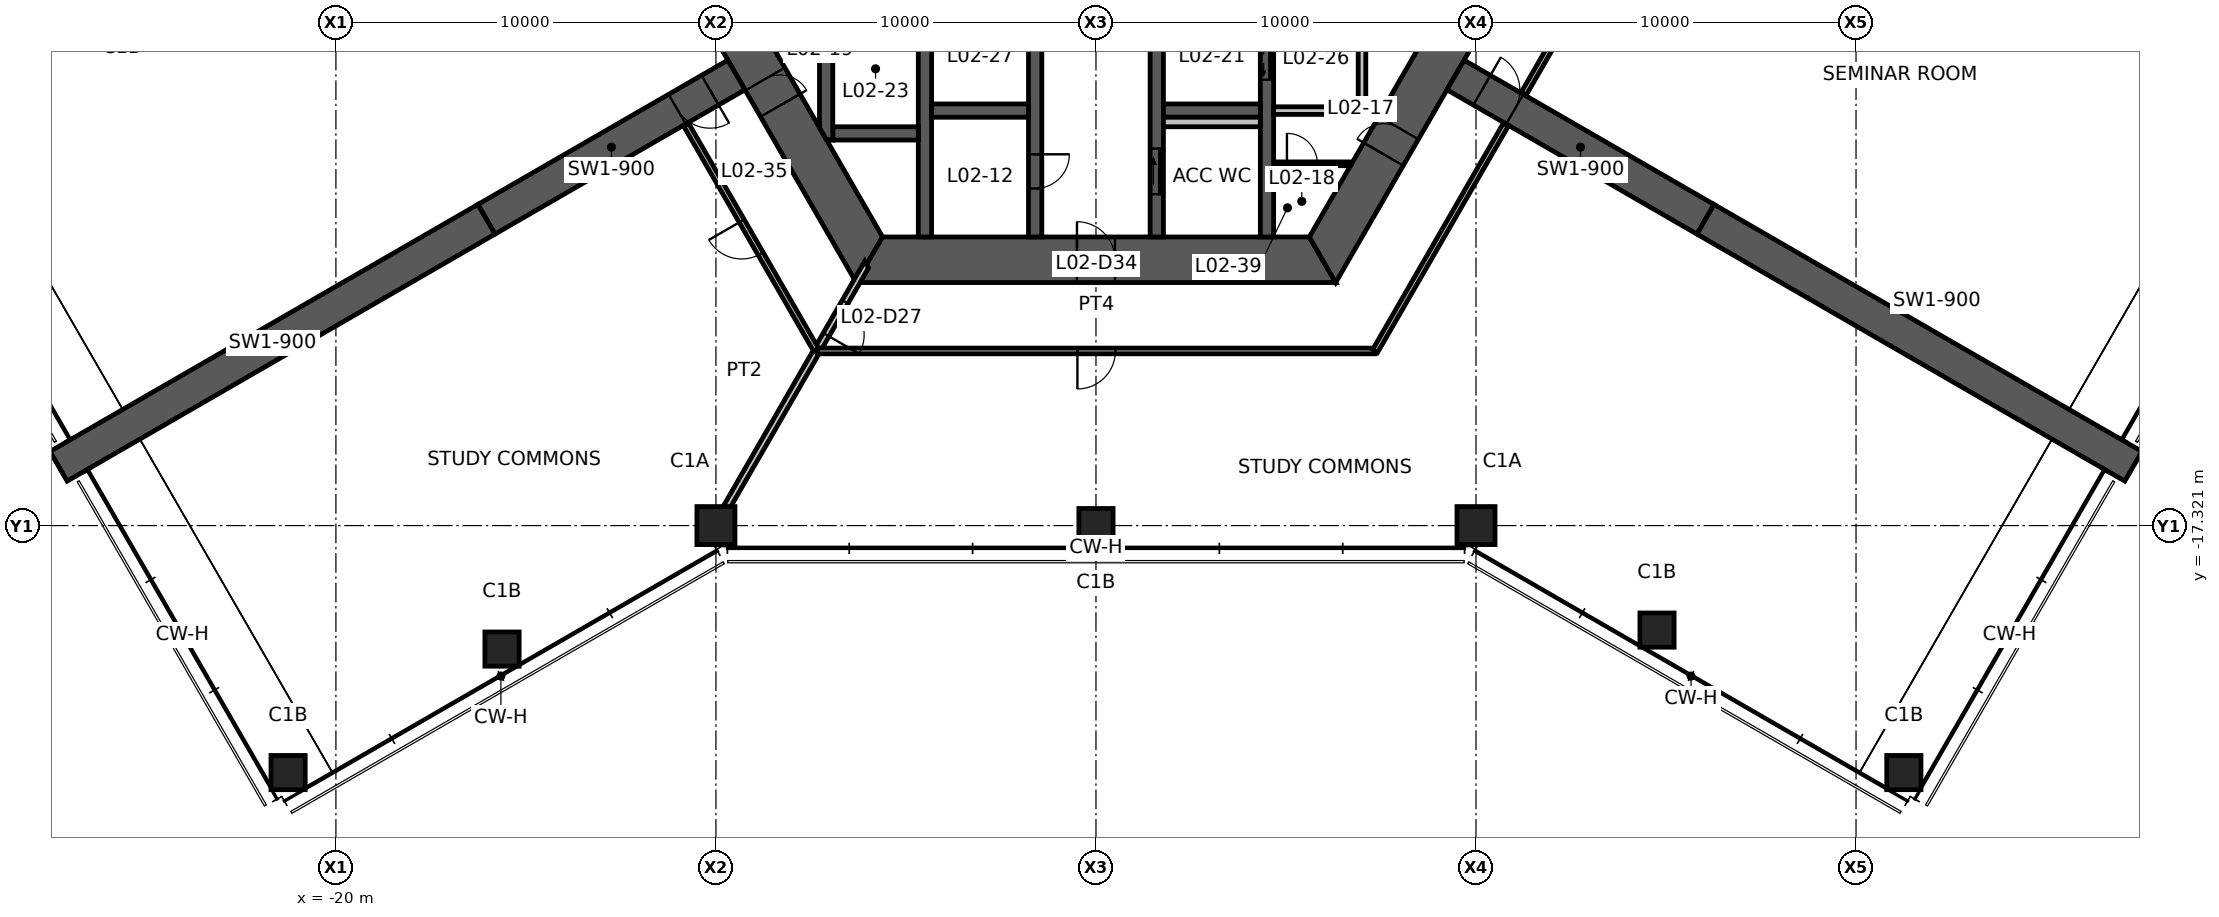
"""IFC4 building model, lengths in metres.
Left out: names, types, materials, properties, quantities, classifications, styles, units other than length and angle.
Written with IfcOpenShell. Run it as: python <this file> out.ifc"""

import sys

from ifc_helpers import new_model, si_unit, direction, frame, frame_2d, origin, origin_2d, place, context, subcontext, project, spatial, polyline, rectangle, hollow_rectangle, outline, extrude, element, fill, save


model = new_model("IFC4")
c1 = context("Model", 3, precision=1e-05, world=origin(), true_north=direction((0.0, 1.0)))
c2 = subcontext(c1, "Body", "Model", "MODEL_VIEW")
j1 = project(units=[si_unit("LENGTHUNIT", "METRE"), si_unit("PLANEANGLEUNIT", "RADIAN")], contexts=[c1])
p1 = place(None, origin())
s1 = spatial("IfcSite", under=j1, at=p1, CompositionType="ELEMENT")
p2 = place(p1, origin())
s2 = spatial("IfcBuilding", under=s1, at=p2, CompositionType="ELEMENT")
p3 = place(p2, frame((0.0, 0.0, 5.5)))
s3 = spatial("IfcBuildingStorey", under=s2, at=p3, CompositionType="ELEMENT", Elevation=5.5)
for number, where, z_axis, x_axis in (
    (1, (-10.0, -17.321, 0.0), (0.0, 0.0, 1.0), (1.0, 0.0, 0.0)),
    (2, (10.0, -17.321, 0.0), (0.0, 0.0, 1.0), (1.0, 0.0, 0.0)),
):
    element("IfcColumn", number, at=place(p3, frame(where, z_axis=z_axis, x_axis=x_axis)), inside=s3, PredefinedType="COLUMN", context=c2, shape_type="SweptSolid", body=[
        extrude(hollow_rectangle(XDim=1.0, YDim=1.0, WallThickness=0.06, at=origin_2d()), origin(), (0.0, 0.0, 1.0), 4.5),
    ])
for number, where, z_axis, x_axis in (
    (3, (0.0, -17.321, 0.0), (0.0, 0.0, 1.0), (1.0, 0.0, 0.0)),
    (4, (-15.629, -20.571, 0.0), (0.0, 0.0, 1.0), (1.0, 0.0, 0.0)),
    (5, (-21.258, -23.821, 0.0), (0.0, 0.0, 1.0), (1.0, 0.0, 0.0)),
    (6, (14.763, -20.071, 0.0), (0.0, 0.0, 1.0), (1.0, 0.0, 0.0)),
    (7, (21.258, -23.821, 0.0), (0.0, 0.0, 1.0), (1.0, 0.0, 0.0)),
):
    element("IfcColumn", number, at=place(p3, frame(where, z_axis=z_axis, x_axis=x_axis)), inside=s3, PredefinedType="COLUMN", context=c2, shape_type="SweptSolid", body=[
        extrude(hollow_rectangle(XDim=0.9, YDim=0.9, WallThickness=0.05, at=origin_2d()), origin(), (0.0, 0.0, 1.0), 4.5),
    ])
p4 = place(p3, frame((-11.922, 0.0, 0.0), z_axis=(0.0, 0.0, 1.0), x_axis=(0.500004296715, -0.866022923061, 0.0)))
e8 = element("IfcWall", 8, at=p4, inside=s3, PredefinedType="SHEAR", context=c2, shape_type="SweptSolid", body=[
    extrude(outline(polyline([(-0.346, -0.6), (6.431, -0.6), (7.231, -0.6), (12.269, -0.6), (11.576, 0.6), (7.231, 0.6), (6.431, 0.6), (0.346, 0.6), (-0.346, -0.6)])), origin(), (0.0, 0.0, 1.0), 4.5),
])
p5 = place(p4, frame((6.431, 0.0, 0.0)))
e9 = element("IfcOpeningElement", 9, at=p5, cuts=e8, PredefinedType="OPENING", context=c2, shape_type="SweptSolid", body=[
    extrude(rectangle(XDim=0.8, YDim=2.1, at=frame_2d((0.4, 1.05))), frame((0.0, 0.61, 0.0), z_axis=(0.0, -1.0, 0.0), x_axis=(1.0, 0.0, 0.0)), (0.0, 0.0, 1.0), 1.22),
])
p6 = place(p3, frame((-5.961, -10.325, 0.0), z_axis=(0.0, 0.0, 1.0), x_axis=(1.0, 0.0, 0.0)))
e10 = element("IfcWall", 10, at=p6, inside=s3, PredefinedType="SHEAR", context=c2, shape_type="SweptSolid", body=[
    extrude(outline(polyline([(-0.346, -0.6), (5.461, -0.6), (6.461, -0.6), (12.269, -0.6), (11.576, 0.6), (6.461, 0.6), (5.461, 0.6), (0.346, 0.6), (-0.346, -0.6)])), origin(), (0.0, 0.0, 1.0), 4.5),
])
p7 = place(p6, frame((5.461, 0.0, 0.0)))
e11 = element("IfcOpeningElement", 11, at=p7, cuts=e10, PredefinedType="OPENING", context=c2, shape_type="SweptSolid", body=[
    extrude(rectangle(XDim=1.0, YDim=2.1, at=frame_2d((0.5, 1.05))), frame((0.0, 0.61, 0.0), z_axis=(0.0, -1.0, 0.0), x_axis=(1.0, 0.0, 0.0)), (0.0, 0.0, 1.0), 1.22),
])
p8 = place(p3, frame((5.961, -10.325, 0.0), z_axis=(0.0, 0.0, 1.0), x_axis=(0.500004296715, 0.866022923061, 0.0)))
e12 = element("IfcWall", 12, at=p8, inside=s3, PredefinedType="SHEAR", context=c2, shape_type="SweptSolid", body=[
    extrude(outline(polyline([(-0.346, -0.6), (3.208, -0.6), (4.009, -0.6), (12.269, -0.6), (11.576, 0.6), (4.009, 0.6), (3.208, 0.6), (0.346, 0.6), (-0.346, -0.6)])), origin(), (0.0, 0.0, 1.0), 4.5),
])
p9 = place(p8, frame((3.208, 0.0, 0.0)))
e13 = element("IfcOpeningElement", 13, at=p9, cuts=e12, PredefinedType="OPENING", context=c2, shape_type="SweptSolid", body=[
    extrude(rectangle(XDim=0.8, YDim=2.1, at=frame_2d((0.4, 1.05))), frame((0.0, 0.61, 0.0), z_axis=(0.0, -1.0, 0.0), x_axis=(1.0, 0.0, 0.0)), (0.0, 0.0, 1.0), 1.22),
])
p10 = place(p3, frame((-9.461, -5.462, 0.0), z_axis=(0.0, 0.0, 1.0), x_axis=(-0.866019116917, -0.500010889016, 0.0)))
e14 = element("IfcWall", 14, at=p10, inside=s3, PredefinedType="SHEAR", context=c2, shape_type="SweptSolid", body=[
    extrude(rectangle(XDim=7.595, YDim=0.9, at=frame_2d((3.798, 0.0))), origin(), (0.0, 0.0, 1.0), 4.5),
])
p11 = place(p10, frame((0.8, 0.0, 0.0)))
e15 = element("IfcOpeningElement", 15, at=p11, cuts=e14, PredefinedType="OPENING", context=c2, shape_type="SweptSolid", body=[
    extrude(rectangle(XDim=1.0, YDim=2.1, at=frame_2d((0.5, 1.05))), frame((0.0, 0.46, 0.0), z_axis=(0.0, -1.0, 0.0), x_axis=(1.0, 0.0, 0.0)), (0.0, 0.0, 1.0), 0.92),
])
p12 = place(p3, frame((-16.039, -9.26, 0.0), z_axis=(0.0, 0.0, 1.0), x_axis=(-0.866024837091, -0.50000098154, 0.0)))
e16 = element("IfcWall", 16, at=p12, inside=s3, PredefinedType="SHEAR", context=c2, shape_type="SweptSolid", body=[
    extrude(rectangle(XDim=13.0, YDim=0.9, at=frame_2d((6.5, 0.0))), origin(), (0.0, 0.0, 1.0), 4.5),
])
p13 = place(p3, frame((9.461, -5.462, 0.0), z_axis=(0.0, 0.0, 1.0), x_axis=(0.866019116917, -0.500010889016, 0.0)))
e17 = element("IfcWall", 17, at=p13, inside=s3, PredefinedType="SHEAR", context=c2, shape_type="SweptSolid", body=[
    extrude(rectangle(XDim=7.595, YDim=0.9, at=frame_2d((3.798, 0.0))), origin(), (0.0, 0.0, 1.0), 4.5),
])
p14 = place(p13, frame((0.8, 0.0, 0.0)))
e18 = element("IfcOpeningElement", 18, at=p14, cuts=e17, PredefinedType="OPENING", context=c2, shape_type="SweptSolid", body=[
    extrude(rectangle(XDim=1.0, YDim=2.1, at=frame_2d((0.5, 1.05))), frame((0.0, 0.46, 0.0), z_axis=(0.0, -1.0, 0.0), x_axis=(1.0, 0.0, 0.0)), (0.0, 0.0, 1.0), 0.92),
])
p15 = place(p3, frame((16.039, -9.26, 0.0), z_axis=(0.0, 0.0, 1.0), x_axis=(0.866024837091, -0.50000098154, 0.0)))
e19 = element("IfcWall", 19, at=p15, inside=s3, PredefinedType="SHEAR", context=c2, shape_type="SweptSolid", body=[
    extrude(rectangle(XDim=13.0, YDim=0.9, at=frame_2d((6.5, 0.0))), origin(), (0.0, 0.0, 1.0), 4.5),
])
p16 = place(p3, frame((-1.6, -3.775, 0.0), z_axis=(0.0, 0.0, 1.0), x_axis=(0.0, -1.0, 0.0)))
e20 = element("IfcWall", 20, at=p16, inside=s3, PredefinedType="SHEAR", context=c2, shape_type="SweptSolid", body=[
    extrude(rectangle(XDim=5.95, YDim=0.35, at=frame_2d((2.975, 0.0))), origin(), (0.0, 0.0, 1.0), 4.5),
])
p17 = place(p16, frame((3.775, 0.0, 0.0)))
e21 = element("IfcOpeningElement", 21, at=p17, cuts=e20, PredefinedType="OPENING", context=c2, shape_type="SweptSolid", body=[
    extrude(rectangle(XDim=0.9, YDim=2.1, at=frame_2d((0.45, 1.05))), frame((0.0, 0.185, 0.0), z_axis=(0.0, -1.0, 0.0), x_axis=(1.0, 0.0, 0.0)), (0.0, 0.0, 1.0), 0.37),
])
p18 = place(p3, frame((1.6, -3.775, 0.0), z_axis=(0.0, 0.0, 1.0), x_axis=(0.0, -1.0, 0.0)))
e22 = element("IfcWall", 22, at=p18, inside=s3, PredefinedType="SHEAR", context=c2, shape_type="SweptSolid", body=[
    extrude(rectangle(XDim=5.95, YDim=0.35, at=frame_2d((2.975, 0.0))), origin(), (0.0, 0.0, 1.0), 4.5),
])
p19 = place(p18, frame((3.625, 0.0, 0.0)))
e23 = element("IfcOpeningElement", 23, at=p19, cuts=e22, PredefinedType="OPENING", context=c2, shape_type="SweptSolid", body=[
    extrude(rectangle(XDim=1.2, YDim=2.1, at=frame_2d((0.6, 1.05))), frame((0.0, 0.185, 0.0), z_axis=(0.0, -1.0, 0.0), x_axis=(1.0, 0.0, 0.0)), (0.0, 0.0, 1.0), 0.37),
])
p20 = place(p3, frame((-4.5, -3.775, 0.0), z_axis=(0.0, 0.0, 1.0), x_axis=(0.0, -1.0, 0.0)))
e24 = element("IfcWall", 24, at=p20, inside=s3, PredefinedType="SHEAR", context=c2, shape_type="SweptSolid", body=[
    extrude(rectangle(XDim=5.95, YDim=0.35, at=frame_2d((2.975, 0.0))), origin(), (0.0, 0.0, 1.0), 4.5),
])
p21 = place(p3, frame((4.5, -3.775, 0.0), z_axis=(0.0, 0.0, 1.0), x_axis=(0.0, -1.0, 0.0)))
e25 = element("IfcWall", 25, at=p21, inside=s3, PredefinedType="SHEAR", context=c2, shape_type="SweptSolid", body=[
    extrude(rectangle(XDim=5.95, YDim=0.35, at=frame_2d((2.975, 0.0))), origin(), (0.0, 0.0, 1.0), 4.5),
])
p22 = place(p21, frame((0.712, 0.0, 0.0)))
e26 = element("IfcOpeningElement", 26, at=p22, cuts=e25, PredefinedType="OPENING", context=c2, shape_type="SweptSolid", body=[
    extrude(rectangle(XDim=1.1, YDim=2.1, at=frame_2d((0.55, 1.05))), frame((0.0, 0.185, 0.0), z_axis=(0.0, -1.0, 0.0), x_axis=(1.0, 0.0, 0.0)), (0.0, 0.0, 1.0), 0.37),
])
for number, where, z_axis, x_axis in (
    (27, (-4.325, -6.4, 0.0), (0.0, 0.0, 1.0), (1.0, 0.0, 0.0)),
    (28, (1.775, -6.4, 0.0), (0.0, 0.0, 1.0), (1.0, 0.0, 0.0)),
):
    element("IfcWall", number, at=place(p3, frame(where, z_axis=z_axis, x_axis=x_axis)), inside=s3, PredefinedType="SHEAR", context=c2, shape_type="SweptSolid", body=[
        extrude(rectangle(XDim=2.55, YDim=0.35, at=frame_2d((1.275, 0.0))), origin(), (0.0, 0.0, 1.0), 4.5),
    ])
p23 = place(p3, frame((-6.925, -7.0, 0.0), z_axis=(0.0, 0.0, 1.0), x_axis=(1.0, 0.0, 0.0)))
e29 = element("IfcWall", 29, at=p23, inside=s3, PredefinedType="SHEAR", context=c2, shape_type="SweptSolid", body=[
    extrude(rectangle(XDim=2.25, YDim=0.35, at=frame_2d((1.125, 0.0))), origin(), (0.0, 0.0, 1.0), 4.5),
])
p24 = place(p3, frame((-7.1, -3.775, 0.0), z_axis=(0.0, 0.0, 1.0), x_axis=(0.0, -1.0, 0.0)))
e30 = element("IfcWall", 30, at=p24, inside=s3, PredefinedType="SHEAR", context=c2, shape_type="SweptSolid", body=[
    extrude(outline(polyline([(0.0, -0.175), (3.074, -0.175), (3.377, 0.0), (3.4, 0.175), (0.0, 0.175), (0.0, -0.175)])), origin(), (0.0, 0.0, 1.0), 4.5),
])
p25 = place(p3, frame((4.675, -6.4, 0.0), z_axis=(0.0, 0.0, 1.0), x_axis=(1.0, 0.0, 0.0)))
e31 = element("IfcWall", 31, at=p25, inside=s3, PredefinedType="STANDARD", context=c2, shape_type="SweptSolid", body=[
    extrude(rectangle(XDim=2.425, YDim=0.2, at=frame_2d((1.212, 0.0))), origin(), (0.0, 0.0, 1.0), 4.5),
])
p26 = place(p3, frame((7.0, -3.775, 0.0), z_axis=(0.0, 0.0, 1.0), x_axis=(0.0, -1.0, 0.0)))
e32 = element("IfcWall", 32, at=p26, inside=s3, PredefinedType="STANDARD", context=c2, shape_type="SweptSolid", body=[
    extrude(rectangle(XDim=2.525, YDim=0.2, at=frame_2d((1.263, 0.0))), origin(), (0.0, 0.0, 1.0), 4.5),
])
p27 = place(p3, frame((1.775, -6.7, 0.0), z_axis=(0.0, 0.0, 1.0), x_axis=(1.0, 0.0, 0.0)))
e33 = element("IfcWall", 33, at=p27, inside=s3, PredefinedType="PLUMBINGWALL", context=c2, shape_type="SweptSolid", body=[
    extrude(rectangle(XDim=2.55, YDim=0.25, at=frame_2d((1.275, 0.0))), origin(), (0.0, 0.0, 1.0), 4.5),
])
p28 = place(p3, frame((4.675, -7.8, 0.0), z_axis=(0.0, 0.0, 1.0), x_axis=(1.0, 0.0, 0.0)))
e34 = element("IfcWall", 34, at=p28, inside=s3, PredefinedType="PARTITIONING", context=c2, shape_type="SweptSolid", body=[
    extrude(outline(polyline([(0.0, -0.05), (0.35, -0.05), (1.15, -0.05), (2.022, -0.05), (2.051, 0.0), (2.057, 0.05), (1.15, 0.05), (0.35, 0.05), (0.0, 0.05), (0.0, -0.05)])), origin(), (0.0, 0.0, 1.0), 3.5),
])
p29 = place(p28, frame((0.35, 0.0, 0.0)))
e35 = element("IfcOpeningElement", 35, at=p29, cuts=e34, PredefinedType="OPENING", context=c2, shape_type="SweptSolid", body=[
    extrude(rectangle(XDim=0.8, YDim=2.1, at=frame_2d((0.4, 1.05))), frame((0.0, 0.06, 0.0), z_axis=(0.0, -1.0, 0.0), x_axis=(1.0, 0.0, 0.0)), (0.0, 0.0, 1.0), 0.12),
])
p30 = place(p3, frame((-6.035, -10.453, 0.0), z_axis=(0.0, 0.0, 1.0), x_axis=(-0.499993402427, -0.866029212861, 0.0)))
e36 = element("IfcWall", 36, at=p30, inside=s3, PredefinedType="PARTITIONING", context=c2, shape_type="SweptSolid", body=[
    extrude(outline(polyline([(-0.051, -0.087), (1.129, -0.087), (2.129, -0.087), (7.93, -0.087), (7.93, 0.087), (2.129, 0.087), (1.129, 0.087), (0.051, 0.087), (-0.051, -0.087)])), origin(), (0.0, 0.0, 1.0), 3.6),
])
p31 = place(p30, frame((1.129, 0.0, 0.0)))
e37 = element("IfcOpeningElement", 37, at=p31, cuts=e36, PredefinedType="OPENING", context=c2, shape_type="SweptSolid", body=[
    extrude(rectangle(XDim=1.0, YDim=2.1, at=frame_2d((0.5, 1.05))), frame((0.0, 0.098, 0.0), z_axis=(0.0, -1.0, 0.0), x_axis=(1.0, 0.0, 0.0)), (0.0, 0.0, 1.0), 0.195),
])
p32 = place(p3, frame((-7.358, -12.705, 0.0), z_axis=(0.0, 0.0, 1.0), x_axis=(-0.499985579985, 0.866033729024, 0.0)))
e38 = element("IfcWall", 38, at=p32, inside=s3, PredefinedType="PARTITIONING", context=c2, shape_type="SweptSolid", body=[
    extrude(rectangle(XDim=6.854, YDim=0.15, at=frame_2d((3.427, 0.0))), origin(), (0.0, 0.0, 1.0), 3.5),
])
p33 = place(p32, frame((2.927, 0.0, 0.0)))
e39 = element("IfcOpeningElement", 39, at=p33, cuts=e38, PredefinedType="OPENING", context=c2, shape_type="SweptSolid", body=[
    extrude(rectangle(XDim=1.0, YDim=2.1, at=frame_2d((0.5, 1.05))), frame((0.0, 0.085, 0.0), z_axis=(0.0, -1.0, 0.0), x_axis=(1.0, 0.0, 0.0)), (0.0, 0.0, 1.0), 0.17),
])
p34 = place(p3, frame((14.682, -0.02, 0.0), z_axis=(0.0, 0.0, 1.0), x_axis=(-0.499985579985, -0.866033729024, 0.0)))
e40 = element("IfcWall", 40, at=p34, inside=s3, PredefinedType="PARTITIONING", context=c2, shape_type="SweptSolid", body=[
    extrude(rectangle(XDim=6.854, YDim=0.15, at=frame_2d((3.427, 0.0))), origin(), (0.0, 0.0, 1.0), 3.5),
])
p35 = place(p34, frame((2.927, 0.0, 0.0)))
e41 = element("IfcOpeningElement", 41, at=p35, cuts=e40, PredefinedType="OPENING", context=c2, shape_type="SweptSolid", body=[
    extrude(rectangle(XDim=1.0, YDim=2.1, at=frame_2d((0.5, 1.05))), frame((0.0, 0.085, 0.0), z_axis=(0.0, -1.0, 0.0), x_axis=(1.0, 0.0, 0.0)), (0.0, 0.0, 1.0), 0.17),
])
p36 = place(p3, frame((7.347, -12.725, 0.0), z_axis=(0.0, 0.0, 1.0), x_axis=(-1.0, 0.0, 0.0)))
e42 = element("IfcWall", 42, at=p36, inside=s3, PredefinedType="PARTITIONING", context=c2, shape_type="SweptSolid", body=[
    extrude(rectangle(XDim=14.67, YDim=0.15, at=frame_2d((7.335, 0.0))), origin(), (0.0, 0.0, 1.0), 3.5),
])
p37 = place(p36, frame((6.835, 0.0, 0.0)))
e43 = element("IfcOpeningElement", 43, at=p37, cuts=e42, PredefinedType="OPENING", context=c2, shape_type="SweptSolid", body=[
    extrude(rectangle(XDim=1.0, YDim=2.1, at=frame_2d((0.5, 1.05))), frame((0.0, 0.085, 0.0), z_axis=(0.0, -1.0, 0.0), x_axis=(1.0, 0.0, 0.0)), (0.0, 0.0, 1.0), 0.17),
])
p38 = place(p3, frame((10.785, -6.77, 0.0), z_axis=(0.0, 0.0, 1.0), x_axis=(-0.500003129455, -0.866023596985, 0.0)))
e44 = element("IfcWall", 44, at=p38, inside=s3, PredefinedType="PARTITIONING", context=c2, shape_type="SweptSolid", body=[
    extrude(rectangle(XDim=6.877, YDim=0.15, at=frame_2d((3.438, 0.0))), origin(), (0.0, 0.0, 1.0), 3.5),
])
p39 = place(p7, origin())
e45 = element("IfcDoor", 45, at=p39, inside=s3, OperationType="SINGLE_SWING_LEFT", PredefinedType="DOOR", context=c2, shape_type="SweptSolid", body=[
    extrude(rectangle(XDim=1.0, YDim=2.1, at=frame_2d((0.5, 1.05))), frame((0.0, 0.025, 0.0), z_axis=(0.0, -1.0, 0.0), x_axis=(1.0, 0.0, 0.0)), (0.0, 0.0, 1.0), 0.05),
])
fill(e11, e45)
p40 = place(p9, origin())
e46 = element("IfcDoor", 46, at=p40, inside=s3, OperationType="SINGLE_SWING_LEFT", PredefinedType="DOOR", context=c2, shape_type="SweptSolid", body=[
    extrude(rectangle(XDim=0.8, YDim=2.1, at=frame_2d((0.4, 1.05))), frame((0.0, 0.025, 0.0), z_axis=(0.0, -1.0, 0.0), x_axis=(1.0, 0.0, 0.0)), (0.0, 0.0, 1.0), 0.05),
])
fill(e13, e46)
p41 = place(p5, origin())
e47 = element("IfcDoor", 47, at=p41, inside=s3, OperationType="SINGLE_SWING_RIGHT", PredefinedType="DOOR", context=c2, shape_type="SweptSolid", body=[
    extrude(rectangle(XDim=0.8, YDim=2.1, at=frame_2d((0.4, 1.05))), frame((0.0, 0.025, 0.0), z_axis=(0.0, -1.0, 0.0), x_axis=(1.0, 0.0, 0.0)), (0.0, 0.0, 1.0), 0.05),
])
fill(e9, e47)
p42 = place(p19, origin())
e48 = element("IfcDoor", 48, at=p42, inside=s3, OperationType="SLIDING_TO_LEFT", PredefinedType="DOOR", context=c2, shape_type="SweptSolid", body=[
    extrude(rectangle(XDim=1.2, YDim=2.1, at=frame_2d((0.6, 1.05))), frame((0.0, 0.025, 0.0), z_axis=(0.0, -1.0, 0.0), x_axis=(1.0, 0.0, 0.0)), (0.0, 0.0, 1.0), 0.05),
])
fill(e23, e48)
p43 = place(p17, origin())
e49 = element("IfcDoor", 49, at=p43, inside=s3, OperationType="SINGLE_SWING_LEFT", PredefinedType="DOOR", context=c2, shape_type="SweptSolid", body=[
    extrude(rectangle(XDim=0.9, YDim=2.1, at=frame_2d((0.45, 1.05))), frame((0.0, 0.025, 0.0), z_axis=(0.0, -1.0, 0.0), x_axis=(1.0, 0.0, 0.0)), (0.0, 0.0, 1.0), 0.05),
])
fill(e21, e49)
p44 = place(p11, origin())
e50 = element("IfcDoor", 50, at=p44, inside=s3, OperationType="SINGLE_SWING_LEFT", PredefinedType="DOOR", context=c2, shape_type="SweptSolid", body=[
    extrude(rectangle(XDim=1.0, YDim=2.1, at=frame_2d((0.5, 1.05))), frame((0.0, 0.025, 0.0), z_axis=(0.0, -1.0, 0.0), x_axis=(1.0, 0.0, 0.0)), (0.0, 0.0, 1.0), 0.05),
])
fill(e15, e50)
p45 = place(p14, origin())
e51 = element("IfcDoor", 51, at=p45, inside=s3, OperationType="SINGLE_SWING_LEFT", PredefinedType="DOOR", context=c2, shape_type="SweptSolid", body=[
    extrude(rectangle(XDim=1.0, YDim=2.1, at=frame_2d((0.5, 1.05))), frame((0.0, 0.025, 0.0), z_axis=(0.0, -1.0, 0.0), x_axis=(1.0, 0.0, 0.0)), (0.0, 0.0, 1.0), 0.05),
])
fill(e18, e51)
p46 = place(p29, origin())
e52 = element("IfcDoor", 52, at=p46, inside=s3, OperationType="SINGLE_SWING_LEFT", PredefinedType="DOOR", context=c2, shape_type="SweptSolid", body=[
    extrude(rectangle(XDim=0.8, YDim=2.1, at=frame_2d((0.4, 1.05))), frame((0.0, 0.025, 0.0), z_axis=(0.0, -1.0, 0.0), x_axis=(1.0, 0.0, 0.0)), (0.0, 0.0, 1.0), 0.05),
])
fill(e35, e52)
p47 = place(p31, origin())
e53 = element("IfcDoor", 53, at=p47, inside=s3, OperationType="SINGLE_SWING_RIGHT", PredefinedType="DOOR", context=c2, shape_type="SweptSolid", body=[
    extrude(rectangle(XDim=1.0, YDim=2.1, at=frame_2d((0.5, 1.05))), frame((0.0, 0.025, 0.0), z_axis=(0.0, -1.0, 0.0), x_axis=(1.0, 0.0, 0.0)), (0.0, 0.0, 1.0), 0.05),
])
fill(e37, e53)
p48 = place(p33, origin())
e54 = element("IfcDoor", 54, at=p48, inside=s3, OperationType="SINGLE_SWING_RIGHT", PredefinedType="DOOR", context=c2, shape_type="SweptSolid", body=[
    extrude(rectangle(XDim=1.0, YDim=2.1, at=frame_2d((0.5, 1.05))), frame((0.0, 0.025, 0.0), z_axis=(0.0, -1.0, 0.0), x_axis=(1.0, 0.0, 0.0)), (0.0, 0.0, 1.0), 0.05),
])
fill(e39, e54)
p49 = place(p37, origin())
e55 = element("IfcDoor", 55, at=p49, inside=s3, OperationType="SINGLE_SWING_RIGHT", PredefinedType="DOOR", context=c2, shape_type="SweptSolid", body=[
    extrude(rectangle(XDim=1.0, YDim=2.1, at=frame_2d((0.5, 1.05))), frame((0.0, 0.025, 0.0), z_axis=(0.0, -1.0, 0.0), x_axis=(1.0, 0.0, 0.0)), (0.0, 0.0, 1.0), 0.05),
])
fill(e43, e55)
p50 = place(p22, origin())
e56 = element("IfcDoor", 56, at=p50, inside=s3, OperationType="DOUBLE_DOOR_SLIDING", PredefinedType="DOOR", context=c2, shape_type="SweptSolid", body=[
    extrude(rectangle(XDim=1.1, YDim=2.1, at=frame_2d((0.55, 1.05))), frame((0.0, 0.025, 0.0), z_axis=(0.0, -1.0, 0.0), x_axis=(1.0, 0.0, 0.0)), (0.0, 0.0, 1.0), 0.05),
])
fill(e26, e56)
save(model, sys.argv[1])
